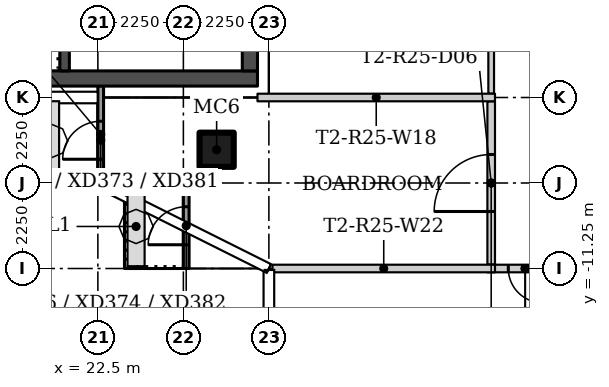
"""IFC4 building model, lengths in metres.
Left out: names, types, materials, properties, quantities, classifications, styles, units other than length and angle.
Written with IfcOpenShell. Run it as: python <this file> out.ifc"""

import sys

from ifc_helpers import new_model, si_unit, direction, frame, frame_2d, origin, origin_2d, place, context, subcontext, project, spatial, rectangle, hollow_rectangle, extrude, element, fill, save


model = new_model("IFC4")
c1 = context("Model", 3, precision=1e-05, world=origin(), true_north=direction((0.0, 1.0)))
c2 = subcontext(c1, "Body", "Model", "MODEL_VIEW")
j1 = project(units=[si_unit("LENGTHUNIT", "METRE"), si_unit("PLANEANGLEUNIT", "RADIAN")], contexts=[c1])
p1 = place(None, origin())
s1 = spatial("IfcSite", under=j1, at=p1, CompositionType="ELEMENT")
p2 = place(p1, origin())
s2 = spatial("IfcBuilding", under=s1, at=p2, CompositionType="ELEMENT")
p3 = place(p2, frame((0.0, 0.0, 230.4)))
s3 = spatial("IfcBuildingStorey", under=s2, at=p3, CompositionType="ELEMENT", Elevation=230.4)
p4 = place(p3, frame((25.625, -8.125, 0.0)))
e1 = element("IfcColumn", 1, at=p4, inside=s3, PredefinedType="COLUMN", context=c2, shape_type="SweptSolid", body=[
    extrude(hollow_rectangle(XDim=0.9, YDim=0.9, WallThickness=0.036, at=origin_2d()), origin(), (0.0, 0.0, 1.0), 3.55),
])
p5 = place(p3, frame((32.85, -6.65, 0.0), z_axis=(0.0, 0.0, 1.0), x_axis=(0.0, 1.0, 0.0)))
e2 = element("IfcWall", 2, at=p5, inside=s3, PredefinedType="PARTITIONING", context=c2, shape_type="SweptSolid", body=[
    extrude(rectangle(XDim=6.625, YDim=0.15, at=frame_2d((3.312, 0.0))), origin(), (0.0, 0.0, 1.0), 3.55),
])
p6 = place(p5, frame((2.85, 0.0, 0.0)))
e3 = element("IfcOpeningElement", 3, at=p6, cuts=e2, PredefinedType="OPENING", context=c2, shape_type="SweptSolid", body=[
    extrude(rectangle(XDim=0.9, YDim=2.1, at=frame_2d((0.45, 1.05))), frame((0.0, 0.085, 0.0), z_axis=(0.0, -1.0, 0.0), x_axis=(1.0, 0.0, 0.0)), (0.0, 0.0, 1.0), 0.17),
])
p7 = place(p3, frame((32.85, -11.15, 0.0), z_axis=(0.0, 0.0, 1.0), x_axis=(0.0, 1.0, 0.0)))
e4 = element("IfcWall", 4, at=p7, inside=s3, PredefinedType="PARTITIONING", context=c2, shape_type="SweptSolid", body=[
    extrude(rectangle(XDim=4.3, YDim=0.2, at=frame_2d((2.15, 0.0))), origin(), (0.0, 0.0, 1.0), 3.55),
])
p8 = place(p7, frame((1.4, 0.0, 0.0)))
e5 = element("IfcOpeningElement", 5, at=p8, cuts=e4, PredefinedType="OPENING", context=c2, shape_type="SweptSolid", body=[
    extrude(rectangle(XDim=1.5, YDim=2.4, at=frame_2d((0.75, 1.2))), frame((0.0, 0.11, 0.0), z_axis=(0.0, -1.0, 0.0), x_axis=(1.0, 0.0, 0.0)), (0.0, 0.0, 1.0), 0.22),
])
p9 = place(p3, frame((34.725, -11.25, 0.0), z_axis=(0.0, 0.0, 1.0), x_axis=(-1.0, 0.0, 0.0)))
e6 = element("IfcWall", 6, at=p9, inside=s3, PredefinedType="PARTITIONING", context=c2, shape_type="SweptSolid", body=[
    extrude(rectangle(XDim=1.976, YDim=0.2, at=frame_2d((0.988, 0.0))), origin(), (0.0, 0.0, 1.0), 3.55),
])
p10 = place(p9, frame((0.525, 0.0, 0.0)))
e7 = element("IfcOpeningElement", 7, at=p10, cuts=e6, PredefinedType="OPENING", context=c2, shape_type="SweptSolid", body=[
    extrude(rectangle(XDim=0.9, YDim=2.4, at=frame_2d((0.45, 1.2))), frame((0.0, 0.11, 0.0), z_axis=(0.0, -1.0, 0.0), x_axis=(1.0, 0.0, 0.0)), (0.0, 0.0, 1.0), 0.22),
])
p11 = place(p3, frame((26.7, -6.75, 0.0)))
e8 = element("IfcWall", 8, at=p11, inside=s3, PredefinedType="PARTITIONING", context=c2, shape_type="SweptSolid", body=[
    extrude(rectangle(XDim=6.25, YDim=0.2, at=frame_2d((3.125, 0.0))), origin(), (0.0, 0.0, 1.0), 3.55),
])
p12 = place(p3, frame((27.095, -11.25, 0.0)))
e9 = element("IfcWall", 9, at=p12, inside=s3, PredefinedType="PARTITIONING", context=c2, shape_type="SweptSolid", body=[
    extrude(rectangle(XDim=5.855, YDim=0.2, at=frame_2d((2.927, 0.0))), origin(), (0.0, 0.0, 1.0), 3.55),
])
p13 = place(p3, frame((22.575, -9.0, 0.0), z_axis=(0.0, 0.0, 1.0), x_axis=(0.0, 1.0, 0.0)))
e10 = element("IfcWall", 10, at=p13, inside=s3, PredefinedType="SOLIDWALL", context=c2, shape_type="SweptSolid", body=[
    extrude(rectangle(XDim=2.557, YDim=0.15, at=frame_2d((1.278, 0.0))), origin(), (0.0, 0.0, 1.0), 3.45),
])
p14 = place(p13, frame((0.625, 0.0, 0.0)))
e11 = element("IfcOpeningElement", 11, at=p14, cuts=e10, PredefinedType="OPENING", context=c2, shape_type="SweptSolid", body=[
    extrude(rectangle(XDim=1.0, YDim=2.4, at=frame_2d((0.5, 1.2))), frame((0.0, 0.085, 0.0), z_axis=(0.0, -1.0, 0.0), x_axis=(1.0, 0.0, 0.0)), (0.0, 0.0, 1.0), 0.17),
])
p15 = place(p3, frame((24.825, -11.25, 0.0), z_axis=(0.0, 0.0, 1.0), x_axis=(0.0, 1.0, 0.0)))
e12 = element("IfcWall", 12, at=p15, inside=s3, PredefinedType="SOLIDWALL", context=c2, shape_type="SweptSolid", body=[
    extrude(rectangle(XDim=2.25, YDim=0.15, at=frame_2d((1.125, 0.0))), origin(), (0.0, 0.0, 1.0), 3.45),
])
p16 = place(p15, frame((0.625, 0.0, 0.0)))
e13 = element("IfcOpeningElement", 13, at=p16, cuts=e12, PredefinedType="OPENING", context=c2, shape_type="SweptSolid", body=[
    extrude(rectangle(XDim=1.0, YDim=2.4, at=frame_2d((0.5, 1.2))), frame((0.0, 0.085, 0.0), z_axis=(0.0, -1.0, 0.0), x_axis=(1.0, 0.0, 0.0)), (0.0, 0.0, 1.0), 0.17),
])
p17 = place(p3, frame((13.8, -6.25, 0.0)))
e14 = element("IfcWall", 14, at=p17, inside=s3, PredefinedType="SHEAR", context=c2, shape_type="SweptSolid", body=[
    extrude(rectangle(XDim=12.9, YDim=0.4, at=frame_2d((6.45, 0.0))), origin(), (0.0, 0.0, 1.0), 3.55),
])
p18 = place(p3, frame((26.5, 6.05, 0.0), z_axis=(0.0, 0.0, 1.0), x_axis=(0.0, -1.0, 0.0)))
e15 = element("IfcWall", 15, at=p18, inside=s3, PredefinedType="SHEAR", context=c2, shape_type="SweptSolid", body=[
    extrude(rectangle(XDim=12.1, YDim=0.4, at=frame_2d((6.05, 0.0))), origin(), (0.0, 0.0, 1.0), 3.55),
])
p19 = place(p18, frame((10.1, 0.0, 0.0)))
e16 = element("IfcOpeningElement", 16, at=p19, cuts=e15, PredefinedType="OPENING", context=c2, shape_type="SweptSolid", body=[
    extrude(rectangle(XDim=1.2, YDim=2.1, at=frame_2d((0.6, 1.05))), frame((0.0, 0.21, 0.0), z_axis=(0.0, -1.0, 0.0), x_axis=(1.0, 0.0, 0.0)), (0.0, 0.0, 1.0), 0.42),
])
p20 = place(p18, frame((3.9, 0.0, 0.0)))
e17 = element("IfcOpeningElement", 17, at=p20, cuts=e15, PredefinedType="OPENING", context=c2, shape_type="SweptSolid", body=[
    extrude(rectangle(XDim=1.8, YDim=2.4, at=frame_2d((0.9, 1.2))), frame((0.0, 0.21, 0.0), z_axis=(0.0, -1.0, 0.0), x_axis=(1.0, 0.0, 0.0)), (0.0, 0.0, 1.0), 0.42),
])
p21 = place(p3, frame((21.625, -6.05, 0.0), z_axis=(0.0, 0.0, 1.0), x_axis=(0.0, 1.0, 0.0)))
e18 = element("IfcWall", 18, at=p21, inside=s3, PredefinedType="SHEAR", context=c2, shape_type="SweptSolid", body=[
    extrude(rectangle(XDim=2.55, YDim=0.25, at=frame_2d((1.275, 0.0))), origin(), (0.0, 0.0, 1.0), 3.55),
])
p22 = place(p10, origin())
e19 = element("IfcDoor", 19, at=p22, inside=s3, OperationType="SINGLE_SWING_RIGHT", PredefinedType="DOOR", context=c2, shape_type="SweptSolid", body=[
    extrude(rectangle(XDim=0.9, YDim=2.4, at=frame_2d((0.45, 1.2))), frame((0.0, 0.025, 0.0), z_axis=(0.0, -1.0, 0.0), x_axis=(1.0, 0.0, 0.0)), (0.0, 0.0, 1.0), 0.05),
])
fill(e7, e19)
p23 = place(p8, origin())
e20 = element("IfcDoor", 20, at=p23, inside=s3, OperationType="DOUBLE_DOOR_SINGLE_SWING", PredefinedType="DOOR", context=c2, shape_type="SweptSolid", body=[
    extrude(rectangle(XDim=1.5, YDim=2.4, at=frame_2d((0.75, 1.2))), frame((0.0, 0.025, 0.0), z_axis=(0.0, -1.0, 0.0), x_axis=(1.0, 0.0, 0.0)), (0.0, 0.0, 1.0), 0.05),
])
fill(e5, e20)
p24 = place(p14, origin())
e21 = element("IfcDoor", 21, at=p24, inside=s3, OperationType="SINGLE_SWING_LEFT", PredefinedType="DOOR", context=c2, shape_type="SweptSolid", body=[
    extrude(rectangle(XDim=1.0, YDim=2.4, at=frame_2d((0.5, 1.2))), frame((0.0, 0.025, 0.0), z_axis=(0.0, -1.0, 0.0), x_axis=(1.0, 0.0, 0.0)), (0.0, 0.0, 1.0), 0.05),
])
fill(e11, e21)
p25 = place(p16, origin())
e22 = element("IfcDoor", 22, at=p25, inside=s3, OperationType="SINGLE_SWING_RIGHT", PredefinedType="DOOR", context=c2, shape_type="SweptSolid", body=[
    extrude(rectangle(XDim=1.0, YDim=2.4, at=frame_2d((0.5, 1.2))), frame((0.0, 0.025, 0.0), z_axis=(0.0, -1.0, 0.0), x_axis=(1.0, 0.0, 0.0)), (0.0, 0.0, 1.0), 0.05),
])
fill(e13, e22)
save(model, sys.argv[1])
